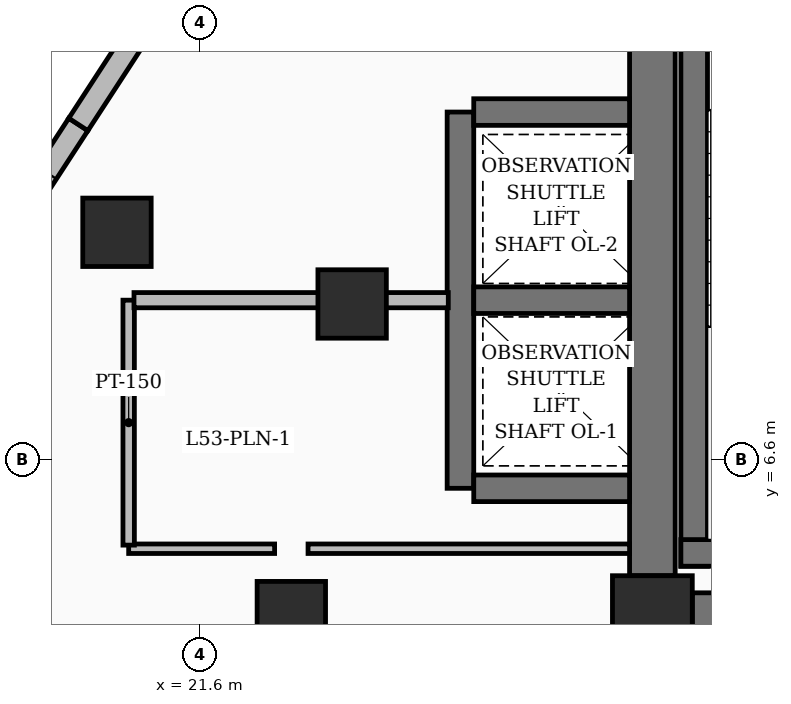
"""IFC4 building model, lengths in metres.
Left out: names, types, materials, properties, quantities, classifications, styles, units other than length and angle.
Written with IfcOpenShell. Run it as: python <this file> out.ifc"""

import sys

from ifc_helpers import new_model, si_unit, direction, frame, frame_2d, origin, origin_2d, place, context, subcontext, project, spatial, rectangle, extrude, element, save


model = new_model("IFC4")
c1 = context("Model", 3, precision=1e-05, world=origin(), true_north=direction((0.0, 1.0)))
c2 = subcontext(c1, "Body", "Model", "MODEL_VIEW")
j1 = project(units=[si_unit("LENGTHUNIT", "METRE"), si_unit("PLANEANGLEUNIT", "RADIAN")], contexts=[c1])
p1 = place(None, origin())
s1 = spatial("IfcSite", under=j1, at=p1, CompositionType="ELEMENT")
p2 = place(p1, origin())
s2 = spatial("IfcBuilding", under=s1, at=p2, CompositionType="ELEMENT")
p3 = place(p2, frame((0.0, 0.0, 207.0)))
s3 = spatial("IfcBuildingStorey", under=s2, at=p3, CompositionType="ELEMENT", Elevation=207.0)
p4 = place(p3, frame((27.55, 4.55, 0.0), z_axis=(0.0, 0.0, 1.0), x_axis=(1.0, 0.0, 0.0)))
e1 = element("IfcColumn", 1, at=p4, inside=s3, PredefinedType="COLUMN", context=c2, shape_type="SweptSolid", body=[
    extrude(rectangle(XDim=1.05, YDim=1.05, at=origin_2d()), origin(), (0.0, 0.0, 1.0), 3.75),
])
for number, where, z_axis, x_axis in (
    (2, (22.8, 4.55, 0.0), (0.0, 0.0, 1.0), (1.0, 0.0, 0.0)),
    (3, (23.6, 8.65, 0.0), (0.0, 0.0, 1.0), (1.0, 0.0, 0.0)),
):
    element("IfcColumn", number, at=place(p3, frame(where, z_axis=z_axis, x_axis=x_axis)), inside=s3, PredefinedType="COLUMN", context=c2, shape_type="SweptSolid", body=[
        extrude(rectangle(XDim=0.9, YDim=0.9, at=origin_2d()), origin(), (0.0, 0.0, 1.0), 3.75),
    ])
p5 = place(p3, frame((28.075, 4.55, 0.0), z_axis=(0.0, 0.0, 1.0), x_axis=(1.0, 0.0, 0.0)))
e4 = element("IfcWall", 4, at=p5, inside=s3, PredefinedType="SHEAR", context=c2, shape_type="SweptSolid", body=[
    extrude(rectangle(XDim=6.55, YDim=0.6, at=frame_2d((3.275, 0.0))), origin(), (0.0, 0.0, 1.0), 3.75),
])
p6 = place(p3, frame((27.55, 5.075, 0.0), z_axis=(0.0, 0.0, 1.0), x_axis=(0.0, 1.0, 0.0)))
e5 = element("IfcWall", 5, at=p6, inside=s3, PredefinedType="SHEAR", context=c2, shape_type="SweptSolid", body=[
    extrude(rectangle(XDim=9.15, YDim=0.6, at=frame_2d((4.575, 0.0))), origin(), (0.0, 0.0, 1.0), 3.75),
])
p7 = place(p3, frame((28.1, 5.2, 0.0), z_axis=(0.0, 0.0, 1.0), x_axis=(0.0, 1.0, 0.0)))
e6 = element("IfcWall", 6, at=p7, inside=s3, PredefinedType="SOLIDWALL", context=c2, shape_type="SweptSolid", body=[
    extrude(rectangle(XDim=9.25, YDim=0.35, at=frame_2d((4.625, 0.0))), origin(), (0.0, 0.0, 1.0), 3.75),
])
p8 = place(p3, frame((27.925, 5.375, 0.0), z_axis=(0.0, 0.0, 1.0), x_axis=(1.0, 0.0, 0.0)))
e7 = element("IfcWall", 7, at=p8, inside=s3, PredefinedType="SOLIDWALL", context=c2, shape_type="SweptSolid", body=[
    extrude(rectangle(XDim=3.55, YDim=0.35, at=frame_2d((1.775, 0.0))), origin(), (0.0, 0.0, 1.0), 3.75),
])
p9 = place(p3, frame((25.025, 6.225, 0.0), z_axis=(0.0, 0.0, 1.0), x_axis=(0.0, 1.0, 0.0)))
e8 = element("IfcWall", 8, at=p9, inside=s3, PredefinedType="SOLIDWALL", context=c2, shape_type="SweptSolid", body=[
    extrude(rectangle(XDim=4.95, YDim=0.35, at=frame_2d((2.475, 0.0))), origin(), (0.0, 0.0, 1.0), 3.75),
])
for number, where, z_axis, x_axis in (
    (9, (25.2, 6.225, 0.0), (0.0, 0.0, 1.0), (1.0, 0.0, 0.0)),
    (10, (25.2, 8.7, 0.0), (0.0, 0.0, 1.0), (1.0, 0.0, 0.0)),
    (11, (25.2, 11.175, 0.0), (0.0, 0.0, 1.0), (1.0, 0.0, 0.0)),
):
    element("IfcWall", number, at=place(p3, frame(where, z_axis=z_axis, x_axis=x_axis)), inside=s3, PredefinedType="SOLIDWALL", context=c2, shape_type="SweptSolid", body=[
        extrude(rectangle(XDim=2.05, YDim=0.35, at=frame_2d((1.025, 0.0))), origin(), (0.0, 0.0, 1.0), 3.75),
    ])
p10 = place(p3, frame((20.506, 9.593, 0.0), z_axis=(0.0, 0.0, 1.0), x_axis=(1.0, 0.0, 0.0)))
e12 = element("IfcColumn", 12, at=p10, inside=s3, PredefinedType="COLUMN", context=c2, shape_type="SweptSolid", body=[
    extrude(rectangle(XDim=0.9, YDim=0.9, at=origin_2d()), origin(), (0.0, 0.0, 1.0), 3.75),
])
p11 = place(p3, frame((16.441, 5.55, 0.0), z_axis=(0.0, 0.0, 1.0), x_axis=(0.545651760549, 0.838012026292, 0.0)))
e13 = element("IfcWall", 13, at=p11, inside=s3, PredefinedType="SOLIDWALL", context=c2, shape_type="SweptSolid", body=[
    extrude(rectangle(XDim=6.518, YDim=0.3, at=frame_2d((3.259, 0.0))), origin(), (0.0, 0.0, 1.0), 3.5),
])
p12 = place(p11, frame((1.21, 0.0, 0.6)))
e14 = element("IfcOpeningElement", 14, at=p12, cuts=e13, PredefinedType="OPENING", context=c2, shape_type="SweptSolid", body=[
    extrude(rectangle(XDim=2.4, YDim=2.1, at=frame_2d((1.2, 1.05))), frame((0.0, 0.16, 0.0), z_axis=(0.0, -1.0, 0.0), x_axis=(1.0, 0.0, 0.0)), (0.0, 0.0, 1.0), 0.32),
])
p13 = place(p11, frame((4.56, 0.0, 0.8)))
e15 = element("IfcOpeningElement", 15, at=p13, cuts=e13, PredefinedType="OPENING", context=c2, shape_type="SweptSolid", body=[
    extrude(rectangle(XDim=1.2, YDim=1.8, at=frame_2d((0.6, 0.9))), frame((0.0, 0.16, 0.0), z_axis=(0.0, -1.0, 0.0), x_axis=(1.0, 0.0, 0.0)), (0.0, 0.0, 1.0), 0.32),
])
p14 = place(p3, frame((19.998, 11.012, 0.0), z_axis=(0.0, 0.0, 1.0), x_axis=(0.545631860444, 0.838024983439, 0.0)))
e16 = element("IfcWall", 16, at=p14, inside=s3, PredefinedType="SOLIDWALL", context=c2, shape_type="SweptSolid", body=[
    extrude(rectangle(XDim=6.853, YDim=0.3, at=frame_2d((3.426, 0.0))), origin(), (0.0, 0.0, 1.0), 3.5),
])
p15 = place(p14, frame((2.475, 0.0, 0.55)))
e17 = element("IfcOpeningElement", 17, at=p15, cuts=e16, PredefinedType="OPENING", context=c2, shape_type="SweptSolid", body=[
    extrude(rectangle(XDim=2.1, YDim=2.4, at=frame_2d((1.05, 1.2))), frame((0.0, 0.16, 0.0), z_axis=(0.0, -1.0, 0.0), x_axis=(1.0, 0.0, 0.0)), (0.0, 0.0, 1.0), 0.32),
])
p16 = place(p3, frame((22.58, 5.43, 0.0), z_axis=(0.0, 0.0, 1.0), x_axis=(-1.0, 0.0, 0.0)))
e18 = element("IfcWall", 18, at=p16, inside=s3, PredefinedType="PARTITIONING", context=c2, shape_type="SweptSolid", body=[
    extrude(rectangle(XDim=1.92, YDim=0.125, at=frame_2d((0.96, 0.0))), origin(), (0.0, 0.0, 1.0), 2.82),
])
p17 = place(p3, frame((27.25, 5.43, 0.0), z_axis=(0.0, 0.0, 1.0), x_axis=(-1.0, 0.0, 0.0)))
e19 = element("IfcWall", 19, at=p17, inside=s3, PredefinedType="PARTITIONING", context=c2, shape_type="SweptSolid", body=[
    extrude(rectangle(XDim=4.23, YDim=0.125, at=frame_2d((2.115, 0.0))), origin(), (0.0, 0.0, 1.0), 3.5),
])
p18 = place(p3, frame((20.66, 5.478, 0.0), z_axis=(0.0, 0.0, 1.0), x_axis=(0.0, 1.0, 0.0)))
e20 = element("IfcWall", 20, at=p18, inside=s3, PredefinedType="PARTITIONING", context=c2, shape_type="SweptSolid", body=[
    extrude(rectangle(XDim=3.222, YDim=0.15, at=frame_2d((1.611, 0.0))), origin(), (0.0, 0.0, 1.0), 3.5),
])
p19 = place(p3, frame((23.6, 8.7, 0.0), z_axis=(0.0, 0.0, 1.0), x_axis=(-1.0, 0.0, 0.0)))
e21 = element("IfcWall", 21, at=p19, inside=s3, PredefinedType="PARTITIONING", context=c2, shape_type="SweptSolid", body=[
    extrude(rectangle(XDim=2.87, YDim=0.2, at=frame_2d((1.435, 0.0))), origin(), (0.0, 0.0, 1.0), 2.685),
])
p20 = place(p3, frame((24.865, 8.7, 0.0), z_axis=(0.0, 0.0, 1.0), x_axis=(-1.0, 0.0, 0.0)))
e22 = element("IfcWall", 22, at=p20, inside=s3, PredefinedType="PARTITIONING", context=c2, shape_type="SweptSolid", body=[
    extrude(rectangle(XDim=1.265, YDim=0.2, at=frame_2d((0.632, 0.0))), origin(), (0.0, 0.0, 1.0), 3.5),
])
save(model, sys.argv[1])
